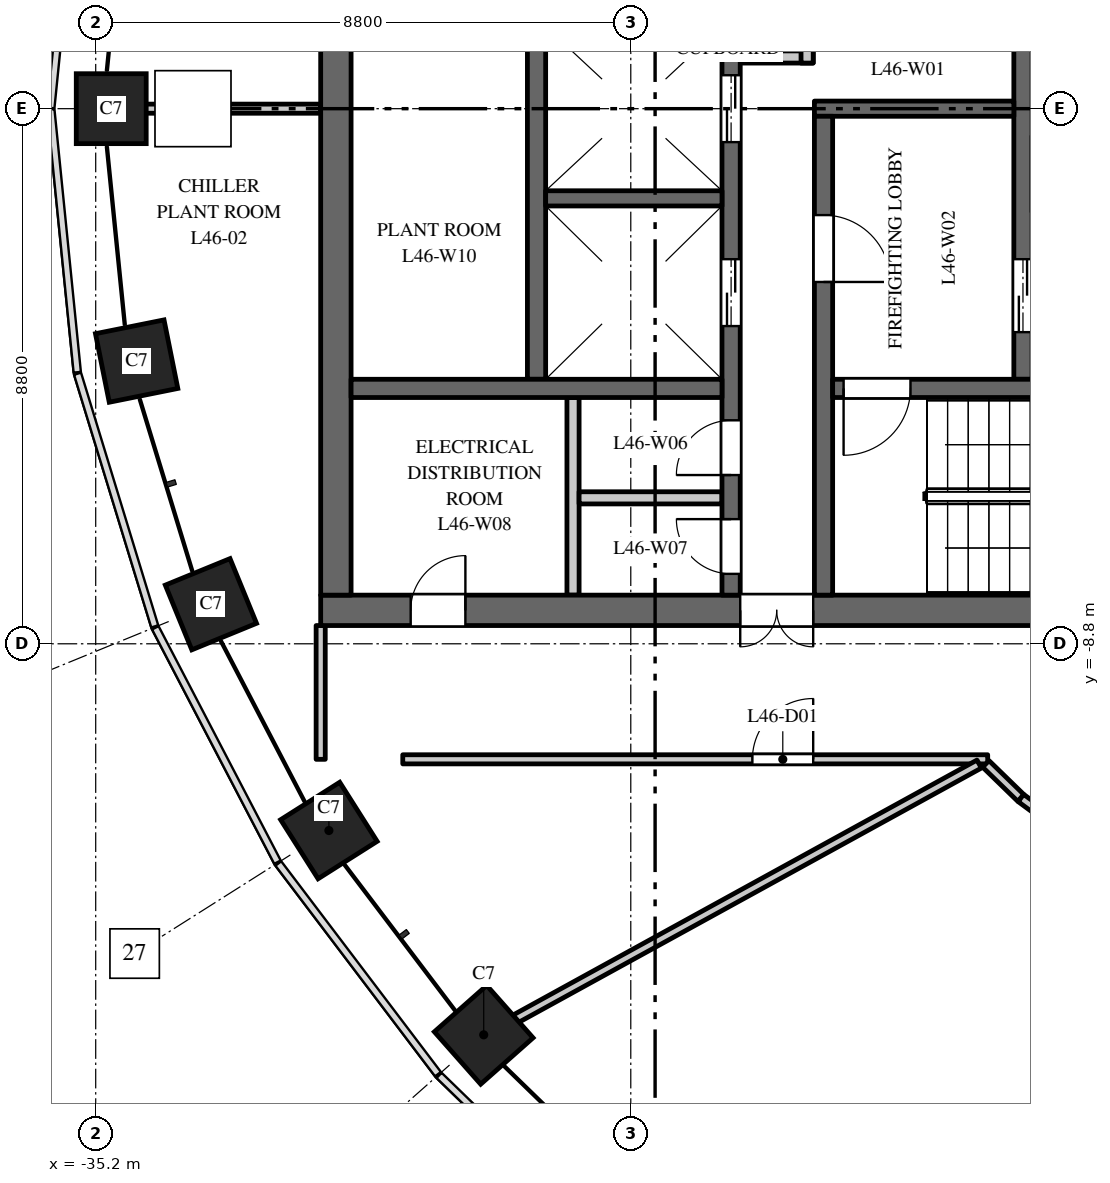
"""IFC4 building model, lengths in metres.
Left out: names, types, materials, properties, quantities, classifications, styles, units other than length and angle.
Written with IfcOpenShell. Run it as: python <this file> out.ifc"""

import sys

from ifc_helpers import new_model, si_unit, direction, frame, frame_2d, origin, origin_2d, place, context, subcontext, project, spatial, rectangle, extrude, element, fill, save


model = new_model("IFC4")
c1 = context("Model", 3, precision=1e-05, world=origin(), true_north=direction((0.0, 1.0)))
c2 = subcontext(c1, "Body", "Model", "MODEL_VIEW")
j1 = project(units=[si_unit("LENGTHUNIT", "METRE"), si_unit("PLANEANGLEUNIT", "RADIAN")], contexts=[c1])
p1 = place(None, origin())
s1 = spatial("IfcSite", under=j1, at=p1, CompositionType="ELEMENT")
p2 = place(p1, origin())
s2 = spatial("IfcBuilding", under=s1, at=p2, CompositionType="ELEMENT")
p3 = place(p2, frame((0.0, 0.0, 198.0)))
s3 = spatial("IfcBuildingStorey", under=s2, at=p3, CompositionType="ELEMENT", Elevation=198.0)
for number, where, z_axis, x_axis in (
    (1, (-34.945, 0.0, 0.0), (0.0, 0.0, 1.0), (0.0, -1.0, 0.0)),
    (2, (-34.527, -4.151, 0.0), (0.0, 0.0, 1.0), (0.197, -0.98, 0.0)),
    (3, (-33.305, -8.149, 0.0), (0.0, 0.0, 1.0), (0.379, -0.925, 0.0)),
    (4, (-31.365, -11.871, 0.0), (0.0, 0.0, 1.0), (0.535, -0.845, 0.0)),
    (5, (-28.819, -15.23, 0.0), (0.0, 0.0, 1.0), (0.663, -0.749, 0.0)),
):
    element("IfcColumn", number, at=place(p3, frame(where, z_axis=z_axis, x_axis=x_axis)), inside=s3, PredefinedType="COLUMN", context=c2, shape_type="SweptSolid", body=[
        extrude(rectangle(XDim=1.15, YDim=1.15, at=origin_2d()), origin(), (0.0, 0.0, 1.0), 5.5),
    ])
p4 = place(p3, frame((-16.5, -8.25, 0.0), z_axis=(0.0, 0.0, 1.0), x_axis=(-1.0, 0.0, 0.0)))
e6 = element("IfcWall", 6, at=p4, inside=s3, PredefinedType="SHEAR", context=c2, shape_type="SweptSolid", body=[
    extrude(rectangle(XDim=15.0, YDim=0.5, at=frame_2d((7.5, 0.0))), origin(), (0.0, 0.0, 1.0), 5.15),
])
p5 = place(p4, frame((6.9, 0.0, 0.0)))
e7 = element("IfcOpeningElement", 7, at=p5, cuts=e6, PredefinedType="OPENING", context=c2, shape_type="SweptSolid", body=[
    extrude(rectangle(XDim=1.2, YDim=2.1, at=frame_2d((0.6, 1.05))), frame((0.0, 0.26, 0.0), z_axis=(0.0, -1.0, 0.0), x_axis=(1.0, 0.0, 0.0)), (0.0, 0.0, 1.0), 0.52),
])
p6 = place(p4, frame((12.62, 0.0, 0.0)))
e8 = element("IfcOpeningElement", 8, at=p6, cuts=e6, PredefinedType="OPENING", context=c2, shape_type="SweptSolid", body=[
    extrude(rectangle(XDim=0.9, YDim=2.1, at=frame_2d((0.45, 1.05))), frame((0.0, 0.26, 0.0), z_axis=(0.0, -1.0, 0.0), x_axis=(1.0, 0.0, 0.0)), (0.0, 0.0, 1.0), 0.52),
])
p7 = place(p3, frame((-27.95, -4.45, 0.0), z_axis=(0.0, 0.0, 1.0), x_axis=(0.0, 1.0, 0.0)))
e9 = element("IfcWall", 9, at=p7, inside=s3, PredefinedType="SHEAR", context=c2, shape_type="SweptSolid", body=[
    extrude(rectangle(XDim=8.9, YDim=0.3, at=frame_2d((4.45, 0.0))), origin(), (0.0, 0.0, 1.0), 5.15),
])
p8 = place(p3, frame((-19.95, -4.45, 0.0), z_axis=(0.0, 0.0, 1.0), x_axis=(0.0, 1.0, 0.0)))
e10 = element("IfcWall", 10, at=p8, inside=s3, PredefinedType="SHEAR", context=c2, shape_type="SweptSolid", body=[
    extrude(rectangle(XDim=8.9, YDim=0.3, at=frame_2d((4.45, 0.0))), origin(), (0.0, 0.0, 1.0), 5.15),
])
p9 = place(p8, frame((0.775, 0.0, 0.0)))
e11 = element("IfcOpeningElement", 11, at=p9, cuts=e10, PredefinedType="OPENING", context=c2, shape_type="SweptSolid", body=[
    extrude(rectangle(XDim=1.2, YDim=2.1, at=frame_2d((0.6, 1.05))), frame((0.0, 0.16, 0.0), z_axis=(0.0, -1.0, 0.0), x_axis=(1.0, 0.0, 0.0)), (0.0, 0.0, 1.0), 0.32),
])
p10 = place(p8, frame((7.25, 0.0, 0.0)))
e12 = element("IfcOpeningElement", 12, at=p10, cuts=e10, PredefinedType="OPENING", context=c2, shape_type="SweptSolid", body=[
    extrude(rectangle(XDim=1.1, YDim=2.1, at=frame_2d((0.55, 1.05))), frame((0.0, 0.16, 0.0), z_axis=(0.0, -1.0, 0.0), x_axis=(1.0, 0.0, 0.0)), (0.0, 0.0, 1.0), 0.32),
])
p11 = place(p3, frame((-24.75, -8.0, 0.0), z_axis=(0.0, 0.0, 1.0), x_axis=(0.0, 1.0, 0.0)))
e13 = element("IfcWall", 13, at=p11, inside=s3, PredefinedType="SHEAR", context=c2, shape_type="SweptSolid", body=[
    extrude(rectangle(XDim=16.0, YDim=0.3, at=frame_2d((8.0, 0.0))), origin(), (0.0, 0.0, 1.0), 5.15),
])
p12 = place(p11, frame((4.425, 0.0, 0.0)))
e14 = element("IfcOpeningElement", 14, at=p12, cuts=e13, PredefinedType="OPENING", context=c2, shape_type="SweptSolid", body=[
    extrude(rectangle(XDim=1.1, YDim=2.1, at=frame_2d((0.55, 1.05))), frame((0.0, 0.16, 0.0), z_axis=(0.0, -1.0, 0.0), x_axis=(1.0, 0.0, 0.0)), (0.0, 0.0, 1.0), 0.32),
])
p13 = place(p11, frame((7.45, 0.0, 0.0)))
e15 = element("IfcOpeningElement", 15, at=p13, cuts=e13, PredefinedType="OPENING", context=c2, shape_type="SweptSolid", body=[
    extrude(rectangle(XDim=1.1, YDim=2.1, at=frame_2d((0.55, 1.05))), frame((0.0, 0.16, 0.0), z_axis=(0.0, -1.0, 0.0), x_axis=(1.0, 0.0, 0.0)), (0.0, 0.0, 1.0), 0.32),
])
p14 = place(p11, frame((10.475, 0.0, 0.0)))
e16 = element("IfcOpeningElement", 16, at=p14, cuts=e13, PredefinedType="OPENING", context=c2, shape_type="SweptSolid", body=[
    extrude(rectangle(XDim=1.1, YDim=2.1, at=frame_2d((0.55, 1.05))), frame((0.0, 0.16, 0.0), z_axis=(0.0, -1.0, 0.0), x_axis=(1.0, 0.0, 0.0)), (0.0, 0.0, 1.0), 0.32),
])
p15 = place(p11, frame((13.75, 0.0, 0.0)))
e17 = element("IfcOpeningElement", 17, at=p15, cuts=e13, PredefinedType="OPENING", context=c2, shape_type="SweptSolid", body=[
    extrude(rectangle(XDim=0.9, YDim=2.1, at=frame_2d((0.45, 1.05))), frame((0.0, 0.16, 0.0), z_axis=(0.0, -1.0, 0.0), x_axis=(1.0, 0.0, 0.0)), (0.0, 0.0, 1.0), 0.32),
])
p16 = place(p11, frame((1.975, 0.0, 0.0)))
e18 = element("IfcOpeningElement", 18, at=p16, cuts=e13, PredefinedType="OPENING", context=c2, shape_type="SweptSolid", body=[
    extrude(rectangle(XDim=0.9, YDim=2.1, at=frame_2d((0.45, 1.05))), frame((0.0, 0.16, 0.0), z_axis=(0.0, -1.0, 0.0), x_axis=(1.0, 0.0, 0.0)), (0.0, 0.0, 1.0), 0.32),
])
p17 = place(p11, frame((0.35, 0.0, 0.0)))
e19 = element("IfcOpeningElement", 19, at=p17, cuts=e13, PredefinedType="OPENING", context=c2, shape_type="SweptSolid", body=[
    extrude(rectangle(XDim=0.9, YDim=2.1, at=frame_2d((0.45, 1.05))), frame((0.0, 0.16, 0.0), z_axis=(0.0, -1.0, 0.0), x_axis=(1.0, 0.0, 0.0)), (0.0, 0.0, 1.0), 0.32),
])
p18 = place(p3, frame((-20.1, 0.0, 0.0), z_axis=(0.0, 0.0, 1.0), x_axis=(-1.0, 0.0, 0.0)))
e20 = element("IfcWall", 20, at=p18, inside=s3, PredefinedType="SHEAR", context=c2, shape_type="SweptSolid", body=[
    extrude(rectangle(XDim=3.28, YDim=0.25, at=frame_2d((1.64, 0.0))), origin(), (0.0, 0.0, 1.0), 5.15),
])
p19 = place(p3, frame((-23.4, 0.85, 0.0), z_axis=(0.0, 0.0, 1.0), x_axis=(-1.0, 0.0, 0.0)))
e21 = element("IfcWall", 21, at=p19, inside=s3, PredefinedType="PARTITIONING", context=c2, shape_type="SweptSolid", body=[
    extrude(rectangle(XDim=1.2, YDim=0.2, at=frame_2d((0.6, 0.0))), origin(), (0.0, 0.0, 1.0), 5.15),
])
p20 = place(p3, frame((-23.5, 0.75, 0.0), z_axis=(0.0, 0.0, 1.0), x_axis=(0.0, 1.0, 0.0)))
e22 = element("IfcWall", 22, at=p20, inside=s3, PredefinedType="PARTITIONING", context=c2, shape_type="SweptSolid", body=[
    extrude(rectangle(XDim=1.6, YDim=0.2, at=frame_2d((0.8, 0.0))), origin(), (0.0, 0.0, 1.0), 5.15),
])
p21 = place(p20, frame((0.25, 0.0, 0.0)))
e23 = element("IfcOpeningElement", 23, at=p21, cuts=e22, PredefinedType="OPENING", context=c2, shape_type="SweptSolid", body=[
    extrude(rectangle(XDim=0.9, YDim=2.1, at=frame_2d((0.45, 1.05))), frame((0.0, 0.11, 0.0), z_axis=(0.0, -1.0, 0.0), x_axis=(1.0, 0.0, 0.0)), (0.0, 0.0, 1.0), 0.22),
])
p22 = place(p3, frame((-31.25, -8.0, 0.0), z_axis=(0.0, 0.0, 1.0), x_axis=(0.0, 1.0, 0.0)))
e24 = element("IfcWall", 24, at=p22, inside=s3, PredefinedType="SHEAR", context=c2, shape_type="SweptSolid", body=[
    extrude(rectangle(XDim=16.0, YDim=0.5, at=frame_2d((8.0, 0.0))), origin(), (0.0, 0.0, 1.0), 5.15),
])
p23 = place(p3, frame((-27.35, -8.0, 0.0), z_axis=(0.0, 0.0, 1.0), x_axis=(0.0, 1.0, 0.0)))
e25 = element("IfcWall", 25, at=p23, inside=s3, PredefinedType="PARTITIONING", context=c2, shape_type="SweptSolid", body=[
    extrude(rectangle(XDim=3.25, YDim=0.2, at=frame_2d((1.625, 0.0))), origin(), (0.0, 0.0, 1.0), 5.15),
])
p24 = place(p3, frame((-24.9, -6.4, 0.0), z_axis=(0.0, 0.0, 1.0), x_axis=(-1.0, 0.0, 0.0)))
e26 = element("IfcWall", 26, at=p24, inside=s3, PredefinedType="PARTITIONING", context=c2, shape_type="SweptSolid", body=[
    extrude(rectangle(XDim=2.35, YDim=0.2, at=frame_2d((1.175, 0.0))), origin(), (0.0, 0.0, 1.0), 5.15),
])
p25 = place(p3, frame((-24.9, -4.6, 0.0), z_axis=(0.0, 0.0, 1.0), x_axis=(-1.0, 0.0, 0.0)))
e27 = element("IfcWall", 27, at=p25, inside=s3, PredefinedType="SHEAR", context=c2, shape_type="SweptSolid", body=[
    extrude(rectangle(XDim=6.1, YDim=0.3, at=frame_2d((3.05, 0.0))), origin(), (0.0, 0.0, 1.0), 5.15),
])
p26 = place(p3, frame((-24.9, -1.475, 0.0), z_axis=(0.0, 0.0, 1.0), x_axis=(-1.0, 0.0, 0.0)))
e28 = element("IfcWall", 28, at=p26, inside=s3, PredefinedType="SHEAR", context=c2, shape_type="SweptSolid", body=[
    extrude(rectangle(XDim=2.9, YDim=0.25, at=frame_2d((1.45, 0.0))), origin(), (0.0, 0.0, 1.0), 5.15),
])
p27 = place(p3, frame((-23.23, -8.0, 0.0), z_axis=(0.0, 0.0, 1.0), x_axis=(0.0, 1.0, 0.0)))
e29 = element("IfcWall", 29, at=p27, inside=s3, PredefinedType="SHEAR", context=c2, shape_type="SweptSolid", body=[
    extrude(rectangle(XDim=7.875, YDim=0.3, at=frame_2d((3.938, 0.0))), origin(), (0.0, 0.0, 1.0), 5.15),
])
p28 = place(p27, frame((5.15, 0.0, 0.0)))
e30 = element("IfcOpeningElement", 30, at=p28, cuts=e29, PredefinedType="OPENING", context=c2, shape_type="SweptSolid", body=[
    extrude(rectangle(XDim=1.1, YDim=2.1, at=frame_2d((0.55, 1.05))), frame((0.0, 0.16, 0.0), z_axis=(0.0, -1.0, 0.0), x_axis=(1.0, 0.0, 0.0)), (0.0, 0.0, 1.0), 0.32),
])
p29 = place(p3, frame((-16.9, -4.6, 0.0), z_axis=(0.0, 0.0, 1.0), x_axis=(-1.0, 0.0, 0.0)))
e31 = element("IfcWall", 31, at=p29, inside=s3, PredefinedType="SHEAR", context=c2, shape_type="SweptSolid", body=[
    extrude(rectangle(XDim=6.18, YDim=0.3, at=frame_2d((3.09, 0.0))), origin(), (0.0, 0.0, 1.0), 5.15),
])
p30 = place(p29, frame((4.9, 0.0, 0.0)))
e32 = element("IfcOpeningElement", 32, at=p30, cuts=e31, PredefinedType="OPENING", context=c2, shape_type="SweptSolid", body=[
    extrude(rectangle(XDim=1.1, YDim=2.1, at=frame_2d((0.55, 1.05))), frame((0.0, 0.16, 0.0), z_axis=(0.0, -1.0, 0.0), x_axis=(1.0, 0.0, 0.0)), (0.0, 0.0, 1.0), 0.32),
])
p31 = place(p3, frame((-35.045, 0.0, 0.0), z_axis=(0.0, 0.0, 1.0), x_axis=(1.0, 0.0, 0.0)))
e33 = element("IfcWall", 33, at=p31, inside=s3, PredefinedType="PARTITIONING", context=c2, shape_type="SweptSolid", body=[
    extrude(rectangle(XDim=3.545, YDim=0.15, at=frame_2d((1.772, 0.0))), origin(), (0.0, 0.0, 1.0), 5.15),
])
p32 = place(p3, frame((-31.5, -10.7, 0.0), z_axis=(0.0, 0.0, 1.0), x_axis=(0.0, 1.0, 0.0)))
e34 = element("IfcWall", 34, at=p32, inside=s3, PredefinedType="PARTITIONING", context=c2, shape_type="SweptSolid", body=[
    extrude(rectangle(XDim=2.2, YDim=0.15, at=frame_2d((1.1, 0.0))), origin(), (0.0, 0.0, 1.0), 5.15),
])
p33 = place(p3, frame((-30.15, -10.7, 0.0), z_axis=(0.0, 0.0, 1.0), x_axis=(1.0, 0.0, 0.0)))
e35 = element("IfcWall", 35, at=p33, inside=s3, PredefinedType="PARTITIONING", context=c2, shape_type="SweptSolid", body=[
    extrude(rectangle(XDim=9.62, YDim=0.15, at=frame_2d((4.81, 0.0))), origin(), (0.0, 0.0, 1.0), 4.35),
])
p34 = place(p33, frame((5.75, 0.0, 0.0)))
e36 = element("IfcOpeningElement", 36, at=p34, cuts=e35, PredefinedType="OPENING", context=c2, shape_type="SweptSolid", body=[
    extrude(rectangle(XDim=1.0, YDim=2.1, at=frame_2d((0.5, 1.05))), frame((0.0, 0.085, 0.0), z_axis=(0.0, -1.0, 0.0), x_axis=(1.0, 0.0, 0.0)), (0.0, 0.0, 1.0), 0.17),
])
p35 = place(p3, frame((-28.893, -15.297, 0.0), z_axis=(0.0, 0.0, 1.0), x_axis=(0.876381760949, 0.481617077227, 0.0)))
e37 = element("IfcWall", 37, at=p35, inside=s3, PredefinedType="PARTITIONING", context=c2, shape_type="SweptSolid", body=[
    extrude(rectangle(XDim=9.383, YDim=0.15, at=frame_2d((4.691, 0.0))), origin(), (0.0, 0.0, 1.0), 5.15),
])
p36 = place(p3, frame((-20.561, -10.775, 0.0), z_axis=(0.0, 0.0, 1.0), x_axis=(0.717045449997, -0.697026414591, 0.0)))
e38 = element("IfcWall", 38, at=p36, inside=s3, PredefinedType="PARTITIONING", context=c2, shape_type="SweptSolid", body=[
    extrude(rectangle(XDim=0.805, YDim=0.15, at=frame_2d((0.402, 0.0))), origin(), (0.0, 0.0, 1.0), 5.15),
])
p37 = place(p3, frame((-19.984, -11.336, 0.0), z_axis=(0.0, 0.0, 1.0), x_axis=(0.805191029373, -0.593015519373, 0.0)))
e39 = element("IfcWall", 39, at=p37, inside=s3, PredefinedType="PARTITIONING", context=c2, shape_type="SweptSolid", body=[
    extrude(rectangle(XDim=3.086, YDim=0.15, at=frame_2d((1.543, 0.0))), origin(), (0.0, 0.0, 1.0), 4.2),
])
p38 = place(p9, origin())
e40 = element("IfcDoor", 40, at=p38, inside=s3, OperationType="DOUBLE_DOOR_SLIDING", PredefinedType="DOOR", context=c2, shape_type="SweptSolid", body=[
    extrude(rectangle(XDim=1.2, YDim=2.1, at=frame_2d((0.6, 1.05))), frame((0.0, 0.025, 0.0), z_axis=(0.0, -1.0, 0.0), x_axis=(1.0, 0.0, 0.0)), (0.0, 0.0, 1.0), 0.05),
])
fill(e11, e40)
p39 = place(p12, origin())
e41 = element("IfcDoor", 41, at=p39, inside=s3, OperationType="DOUBLE_DOOR_SLIDING", PredefinedType="DOOR", context=c2, shape_type="SweptSolid", body=[
    extrude(rectangle(XDim=1.1, YDim=2.1, at=frame_2d((0.55, 1.05))), frame((0.0, 0.025, 0.0), z_axis=(0.0, -1.0, 0.0), x_axis=(1.0, 0.0, 0.0)), (0.0, 0.0, 1.0), 0.05),
])
fill(e14, e41)
p40 = place(p13, origin())
e42 = element("IfcDoor", 42, at=p40, inside=s3, OperationType="DOUBLE_DOOR_SLIDING", PredefinedType="DOOR", context=c2, shape_type="SweptSolid", body=[
    extrude(rectangle(XDim=1.1, YDim=2.1, at=frame_2d((0.55, 1.05))), frame((0.0, 0.025, 0.0), z_axis=(0.0, -1.0, 0.0), x_axis=(1.0, 0.0, 0.0)), (0.0, 0.0, 1.0), 0.05),
])
fill(e15, e42)
p41 = place(p30, origin())
e43 = element("IfcDoor", 43, at=p41, inside=s3, OperationType="SINGLE_SWING_LEFT", PredefinedType="DOOR", context=c2, shape_type="SweptSolid", body=[
    extrude(rectangle(XDim=1.1, YDim=2.1, at=frame_2d((0.55, 1.05))), frame((0.0, 0.025, 0.0), z_axis=(0.0, -1.0, 0.0), x_axis=(1.0, 0.0, 0.0)), (0.0, 0.0, 1.0), 0.05),
])
fill(e32, e43)
p42 = place(p28, origin())
e44 = element("IfcDoor", 44, at=p42, inside=s3, OperationType="SINGLE_SWING_LEFT", PredefinedType="DOOR", context=c2, shape_type="SweptSolid", body=[
    extrude(rectangle(XDim=1.1, YDim=2.1, at=frame_2d((0.55, 1.05))), frame((0.0, 0.025, 0.0), z_axis=(0.0, -1.0, 0.0), x_axis=(1.0, 0.0, 0.0)), (0.0, 0.0, 1.0), 0.05),
])
fill(e30, e44)
p43 = place(p5, origin())
e45 = element("IfcDoor", 45, at=p43, inside=s3, OperationType="DOUBLE_DOOR_DOUBLE_SWING", PredefinedType="DOOR", context=c2, shape_type="SweptSolid", body=[
    extrude(rectangle(XDim=1.2, YDim=2.1, at=frame_2d((0.6, 1.05))), frame((0.0, 0.025, 0.0), z_axis=(0.0, -1.0, 0.0), x_axis=(1.0, 0.0, 0.0)), (0.0, 0.0, 1.0), 0.05),
])
fill(e7, e45)
p44 = place(p16, origin())
e46 = element("IfcDoor", 46, at=p44, inside=s3, OperationType="SINGLE_SWING_RIGHT", PredefinedType="DOOR", context=c2, shape_type="SweptSolid", body=[
    extrude(rectangle(XDim=0.9, YDim=2.1, at=frame_2d((0.45, 1.05))), frame((0.0, 0.025, 0.0), z_axis=(0.0, -1.0, 0.0), x_axis=(1.0, 0.0, 0.0)), (0.0, 0.0, 1.0), 0.05),
])
fill(e18, e46)
p45 = place(p17, origin())
e47 = element("IfcDoor", 47, at=p45, inside=s3, OperationType="SINGLE_SWING_LEFT", PredefinedType="DOOR", context=c2, shape_type="SweptSolid", body=[
    extrude(rectangle(XDim=0.9, YDim=2.1, at=frame_2d((0.45, 1.05))), frame((0.0, 0.025, 0.0), z_axis=(0.0, -1.0, 0.0), x_axis=(1.0, 0.0, 0.0)), (0.0, 0.0, 1.0), 0.05),
])
fill(e19, e47)
p46 = place(p6, origin())
e48 = element("IfcDoor", 48, at=p46, inside=s3, OperationType="SINGLE_SWING_LEFT", PredefinedType="DOOR", context=c2, shape_type="SweptSolid", body=[
    extrude(rectangle(XDim=0.9, YDim=2.1, at=frame_2d((0.45, 1.05))), frame((0.0, 0.025, 0.0), z_axis=(0.0, -1.0, 0.0), x_axis=(1.0, 0.0, 0.0)), (0.0, 0.0, 1.0), 0.05),
])
fill(e8, e48)
p47 = place(p34, origin())
e49 = element("IfcDoor", 49, at=p47, inside=s3, OperationType="SINGLE_SWING_RIGHT", PredefinedType="DOOR", context=c2, shape_type="SweptSolid", body=[
    extrude(rectangle(XDim=1.0, YDim=2.1, at=frame_2d((0.5, 1.05))), frame((0.0, 0.025, 0.0), z_axis=(0.0, -1.0, 0.0), x_axis=(1.0, 0.0, 0.0)), (0.0, 0.0, 1.0), 0.05),
])
fill(e36, e49)
save(model, sys.argv[1])
